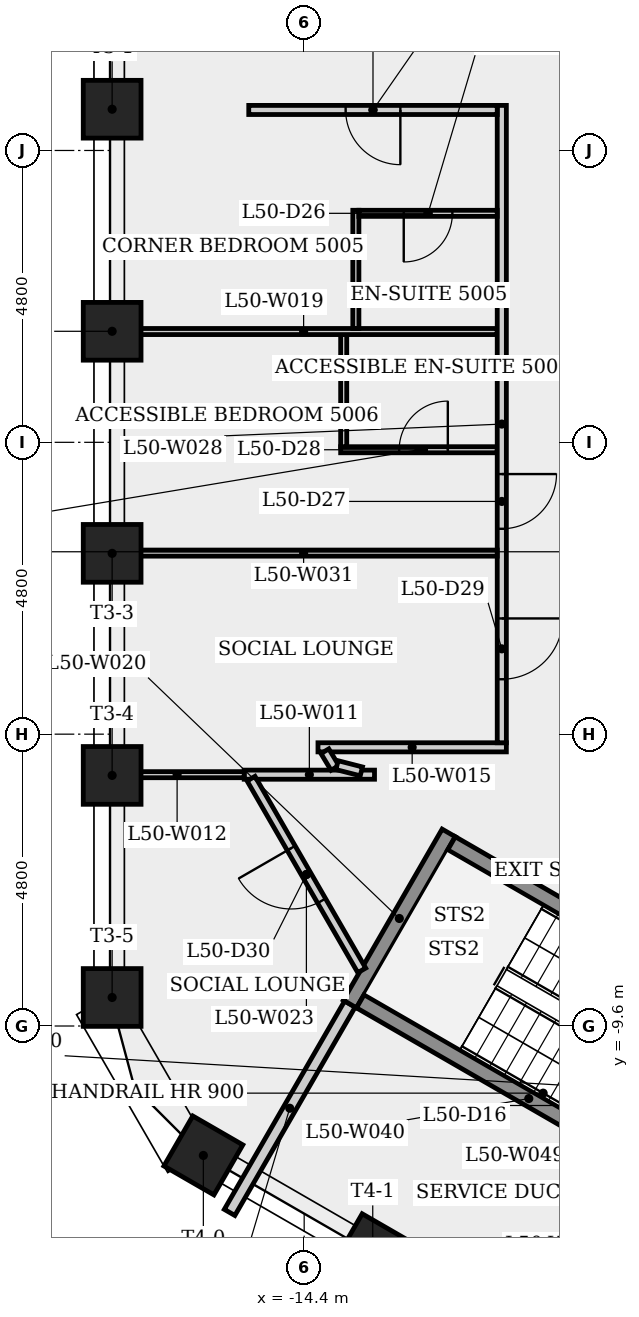
"""IFC4 building model, lengths in metres.
Left out: names, types, materials, properties, quantities, classifications, styles, units other than length and angle.
Written with IfcOpenShell. Run it as: python <this file> out.ifc"""

import sys

from ifc_helpers import new_model, si_unit, direction, frame, frame_2d, origin, origin_2d, place, context, subcontext, project, spatial, rectangle, extrude, element, fill, save


model = new_model("IFC4")
c1 = context("Model", 3, precision=1e-05, world=origin(), true_north=direction((0.0, 1.0)))
c2 = subcontext(c1, "Body", "Model", "MODEL_VIEW")
j1 = project(units=[si_unit("LENGTHUNIT", "METRE"), si_unit("PLANEANGLEUNIT", "RADIAN")], contexts=[c1])
p1 = place(None, origin())
s1 = spatial("IfcSite", under=j1, at=p1, CompositionType="ELEMENT")
p2 = place(p1, origin())
s2 = spatial("IfcBuilding", under=s1, at=p2, CompositionType="ELEMENT")
p3 = place(p2, frame((0.0, 0.0, 186.7)))
s3 = spatial("IfcBuildingStorey", under=s2, at=p3, CompositionType="ELEMENT", Elevation=186.7)
for number, where, z_axis, x_axis in (
    (1, (-17.558, 5.479, 0.0), (0.0, 0.0, 1.0), (-1.0, 0.0, 0.0)),
    (2, (-17.558, 1.826, 0.0), (0.0, 0.0, 1.0), (-1.0, 0.0, 0.0)),
    (3, (-17.558, -1.826, 0.0), (0.0, 0.0, 1.0), (-1.0, 0.0, 0.0)),
    (4, (-17.558, -5.479, 0.0), (0.0, 0.0, 1.0), (-1.0, 0.0, 0.0)),
    (5, (-17.558, -9.131, 0.0), (0.0, 0.0, 1.0), (-1.0, 0.0, 0.0)),
    (6, (-16.058, -11.729, 0.0), (0.0, 0.0, 1.0), (-0.5, -0.866, 0.0)),
    (7, (-13.272, -13.337, 0.0), (0.0, 0.0, 1.0), (-0.5, -0.866, 0.0)),
):
    element("IfcColumn", number, at=place(p3, frame(where, z_axis=z_axis, x_axis=x_axis)), inside=s3, PredefinedType="COLUMN", context=c2, shape_type="SweptSolid", body=[
        extrude(rectangle(XDim=0.95, YDim=0.95, at=origin_2d()), origin(), (0.0, 0.0, 1.0), 4.0),
    ])
p4 = place(p3, frame((-15.627, -12.666, 0.0), z_axis=(0.0, 0.0, 1.0), x_axis=(0.499980548326, 0.866036633923, 0.0)))
e8 = element("IfcWall", 8, at=p4, inside=s3, PredefinedType="PLUMBINGWALL", context=c2, shape_type="SweptSolid", body=[
    extrude(rectangle(XDim=3.958, YDim=0.2, at=frame_2d((1.979, 0.0))), origin(), (0.0, 0.0, 1.0), 3.6),
])
p5 = place(p3, frame((-15.386, -5.466, 0.0), z_axis=(0.0, 0.0, 1.0), x_axis=(1.0, 0.0, 0.0)))
e9 = element("IfcWall", 9, at=p5, inside=s3, PredefinedType="PARTITIONING", context=c2, shape_type="SweptSolid", body=[
    extrude(rectangle(XDim=2.143, YDim=0.15, at=frame_2d((1.072, 0.0))), origin(), (0.0, 0.0, 1.0), 3.6),
])
p6 = place(p3, frame((-15.386, -5.466, 0.0), z_axis=(0.0, 0.0, 1.0), x_axis=(-1.0, 0.0, 0.0)))
e10 = element("IfcWall", 10, at=p6, inside=s3, PredefinedType="PARTITIONING", context=c2, shape_type="SweptSolid", body=[
    extrude(rectangle(XDim=2.207, YDim=0.1, at=frame_2d((1.104, 0.0))), origin(), (0.0, 0.0, 1.0), 3.6),
])
p7 = place(p3, frame((-14.173, -5.016, 0.0), z_axis=(0.0, 0.0, 1.0), x_axis=(1.0, 0.0, 0.0)))
e11 = element("IfcWall", 11, at=p7, inside=s3, PredefinedType="PARTITIONING", context=c2, shape_type="SweptSolid", body=[
    extrude(rectangle(XDim=3.098, YDim=0.15, at=frame_2d((1.549, 0.0))), origin(), (0.0, 0.0, 1.0), 3.6),
])
p8 = place(p3, frame((-13.894, -5.355, 0.0), z_axis=(0.0, 0.0, 1.0), x_axis=(-0.51595199771, 0.856617496937, 0.0)))
e12 = element("IfcWall", 12, at=p8, inside=s3, PredefinedType="PARTITIONING", context=c2, shape_type="SweptSolid", body=[
    extrude(rectangle(XDim=0.32, YDim=0.15, at=frame_2d((0.16, 0.0))), origin(), (0.0, 0.0, 1.0), 3.6),
])
p9 = place(p3, frame((-13.8, -0.122, 0.0), z_axis=(0.0, 0.0, 1.0), x_axis=(1.0, 0.0, 0.0)))
e13 = element("IfcWall", 13, at=p9, inside=s3, PredefinedType="PARTITIONING", context=c2, shape_type="SweptSolid", body=[
    extrude(rectangle(XDim=2.575, YDim=0.1, at=frame_2d((1.288, 0.0))), origin(), (0.0, 0.0, 1.0), 3.6),
])
p10 = place(p9, frame((0.962, 0.0, 0.0)))
e14 = element("IfcOpeningElement", 14, at=p10, cuts=e13, PredefinedType="OPENING", context=c2, shape_type="SweptSolid", body=[
    extrude(rectangle(XDim=0.8, YDim=2.1, at=frame_2d((0.4, 1.05))), frame((0.0, 0.06, 0.0), z_axis=(0.0, -1.0, 0.0), x_axis=(1.0, 0.0, 0.0)), (0.0, 0.0, 1.0), 0.12),
])
p11 = place(p3, frame((-13.75, 1.772, 0.0), z_axis=(0.0, 0.0, 1.0), x_axis=(0.0, -1.0, 0.0)))
e15 = element("IfcWall", 15, at=p11, inside=s3, PredefinedType="PARTITIONING", context=c2, shape_type="SweptSolid", body=[
    extrude(rectangle(XDim=1.844, YDim=0.1, at=frame_2d((0.922, 0.0))), origin(), (0.0, 0.0, 1.0), 3.6),
])
p12 = place(p3, frame((-17.593, 1.822, 0.0), z_axis=(0.0, 0.0, 1.0), x_axis=(1.0, 0.0, 0.0)))
e16 = element("IfcWall", 16, at=p12, inside=s3, PredefinedType="PARTITIONING", context=c2, shape_type="SweptSolid", body=[
    extrude(rectangle(XDim=6.368, YDim=0.1, at=frame_2d((3.184, 0.0))), origin(), (0.0, 0.0, 1.0), 3.6),
])
p13 = place(p3, frame((-13.648, -9.239, 0.0), z_axis=(0.0, 0.0, 1.0), x_axis=(0.500017246033, 0.866015446554, 0.0)))
e17 = element("IfcWall", 17, at=p13, inside=s3, PredefinedType="SHEAR", context=c2, shape_type="SweptSolid", body=[
    extrude(rectangle(XDim=3.25, YDim=0.25, at=frame_2d((1.625, 0.0))), origin(), (0.0, 0.0, 1.0), 3.6),
])
p14 = place(p3, frame((-13.55, 3.816, 0.0), z_axis=(0.0, 0.0, 1.0), x_axis=(0.0, -1.0, 0.0)))
e18 = element("IfcWall", 18, at=p14, inside=s3, PredefinedType="PARTITIONING", context=c2, shape_type="SweptSolid", body=[
    extrude(rectangle(XDim=1.944, YDim=0.1, at=frame_2d((0.972, 0.0))), origin(), (0.0, 0.0, 1.0), 3.6),
])
p15 = place(p3, frame((-13.459, -5.412, 0.0), z_axis=(0.0, 0.0, 1.0), x_axis=(-0.968736704431, 0.248091107232, 0.0)))
e19 = element("IfcWall", 19, at=p15, inside=s3, PredefinedType="PARTITIONING", context=c2, shape_type="SweptSolid", body=[
    extrude(rectangle(XDim=0.413, YDim=0.15, at=frame_2d((0.207, 0.0))), origin(), (0.0, 0.0, 1.0), 3.6),
])
p16 = place(p3, frame((-13.453, -8.685, 0.0), z_axis=(0.0, 0.0, 1.0), x_axis=(-0.499989401968, 0.866031522475, 0.0)))
e20 = element("IfcWall", 20, at=p16, inside=s3, PredefinedType="PARTITIONING", context=c2, shape_type="SweptSolid", body=[
    extrude(rectangle(XDim=3.642, YDim=0.15, at=frame_2d((1.821, 0.0))), origin(), (0.0, 0.0, 1.0), 3.6),
])
p17 = place(p16, frame((1.321, 0.0, 0.0)))
e21 = element("IfcOpeningElement", 21, at=p17, cuts=e20, PredefinedType="OPENING", context=c2, shape_type="SweptSolid", body=[
    extrude(rectangle(XDim=1.0, YDim=2.1, at=frame_2d((0.5, 1.05))), frame((0.0, 0.085, 0.0), z_axis=(0.0, -1.0, 0.0), x_axis=(1.0, 0.0, 0.0)), (0.0, 0.0, 1.0), 0.17),
])
p18 = place(p3, frame((-11.977, -6.595, 0.0), z_axis=(0.0, 0.0, 1.0), x_axis=(0.866025499775, -0.499999833739, 0.0)))
e22 = element("IfcWall", 22, at=p18, inside=s3, PredefinedType="SHEAR", context=c2, shape_type="SweptSolid", body=[
    extrude(rectangle(XDim=6.4, YDim=0.25, at=frame_2d((3.2, 0.0))), origin(), (0.0, 0.0, 1.0), 3.6),
])
p19 = place(p18, frame((5.025, 0.0, 0.0)))
e23 = element("IfcOpeningElement", 23, at=p19, cuts=e22, PredefinedType="OPENING", context=c2, shape_type="SweptSolid", body=[
    extrude(rectangle(XDim=1.0, YDim=2.1, at=frame_2d((0.5, 1.05))), frame((0.0, 0.135, 0.0), z_axis=(0.0, -1.0, 0.0), x_axis=(1.0, 0.0, 0.0)), (0.0, 0.0, 1.0), 0.27),
])
p20 = place(p3, frame((-11.15, 5.542, 0.0), z_axis=(0.0, 0.0, 1.0), x_axis=(0.0, -1.0, 0.0)))
e24 = element("IfcWall", 24, at=p20, inside=s3, PredefinedType="PARTITIONING", context=c2, shape_type="SweptSolid", body=[
    extrude(rectangle(XDim=10.483, YDim=0.15, at=frame_2d((5.241, 0.0))), origin(), (0.0, 0.0, 1.0), 3.6),
])
p21 = place(p20, frame((6.063, 0.0, 0.0)))
e25 = element("IfcOpeningElement", 25, at=p21, cuts=e24, PredefinedType="OPENING", context=c2, shape_type="SweptSolid", body=[
    extrude(rectangle(XDim=0.9, YDim=2.1, at=frame_2d((0.45, 1.05))), frame((0.0, 0.085, 0.0), z_axis=(0.0, -1.0, 0.0), x_axis=(1.0, 0.0, 0.0)), (0.0, 0.0, 1.0), 0.17),
])
p22 = place(p20, frame((8.438, 0.0, 0.0)))
e26 = element("IfcOpeningElement", 26, at=p22, cuts=e24, PredefinedType="OPENING", context=c2, shape_type="SweptSolid", body=[
    extrude(rectangle(XDim=1.0, YDim=2.1, at=frame_2d((0.5, 1.05))), frame((0.0, 0.085, 0.0), z_axis=(0.0, -1.0, 0.0), x_axis=(1.0, 0.0, 0.0)), (0.0, 0.0, 1.0), 0.17),
])
p23 = place(p3, frame((-11.225, 3.766, 0.0), z_axis=(0.0, 0.0, 1.0), x_axis=(-1.0, 0.0, 0.0)))
e27 = element("IfcWall", 27, at=p23, inside=s3, PredefinedType="PARTITIONING", context=c2, shape_type="SweptSolid", body=[
    extrude(rectangle(XDim=2.275, YDim=0.1, at=frame_2d((1.137, 0.0))), origin(), (0.0, 0.0, 1.0), 3.6),
])
p24 = place(p23, frame((0.738, 0.0, 0.0)))
e28 = element("IfcOpeningElement", 28, at=p24, cuts=e27, PredefinedType="OPENING", context=c2, shape_type="SweptSolid", body=[
    extrude(rectangle(XDim=0.8, YDim=2.1, at=frame_2d((0.4, 1.05))), frame((0.0, 0.06, 0.0), z_axis=(0.0, -1.0, 0.0), x_axis=(1.0, 0.0, 0.0)), (0.0, 0.0, 1.0), 0.12),
])
p25 = place(p3, frame((-11.225, 5.466, 0.0), z_axis=(0.0, 0.0, 1.0), x_axis=(-1.0, 0.0, 0.0)))
e29 = element("IfcWall", 29, at=p25, inside=s3, PredefinedType="PARTITIONING", context=c2, shape_type="SweptSolid", body=[
    extrude(rectangle(XDim=4.086, YDim=0.15, at=frame_2d((2.043, 0.0))), origin(), (0.0, 0.0, 1.0), 3.6),
])
p26 = place(p25, frame((1.593, 0.0, 0.0)))
e30 = element("IfcOpeningElement", 30, at=p26, cuts=e29, PredefinedType="OPENING", context=c2, shape_type="SweptSolid", body=[
    extrude(rectangle(XDim=0.9, YDim=2.1, at=frame_2d((0.45, 1.05))), frame((0.0, 0.085, 0.0), z_axis=(0.0, -1.0, 0.0), x_axis=(1.0, 0.0, 0.0)), (0.0, 0.0, 1.0), 0.17),
])
p27 = place(p3, frame((-11.225, -1.822, 0.0), z_axis=(0.0, 0.0, 1.0), x_axis=(-1.0, 0.0, 0.0)))
e31 = element("IfcWall", 31, at=p27, inside=s3, PredefinedType="PARTITIONING", context=c2, shape_type="SweptSolid", body=[
    extrude(rectangle(XDim=6.368, YDim=0.1, at=frame_2d((3.184, 0.0))), origin(), (0.0, 0.0, 1.0), 3.6),
])
p28 = place(p3, frame((-7.935, -12.393, 0.0), z_axis=(0.0, 0.0, 1.0), x_axis=(-0.866025499775, 0.499999833739, 0.0)))
e32 = element("IfcWall", 32, at=p28, inside=s3, PredefinedType="SHEAR", context=c2, shape_type="SweptSolid", body=[
    extrude(rectangle(XDim=6.4, YDim=0.25, at=frame_2d((3.2, 0.0))), origin(), (0.0, 0.0, 1.0), 3.6),
])
p29 = place(p26, origin())
e33 = element("IfcDoor", 33, at=p29, inside=s3, OperationType="SINGLE_SWING_LEFT", PredefinedType="DOOR", context=c2, shape_type="SweptSolid", body=[
    extrude(rectangle(XDim=0.9, YDim=2.1, at=frame_2d((0.45, 1.05))), frame((0.0, 0.025, 0.0), z_axis=(0.0, -1.0, 0.0), x_axis=(1.0, 0.0, 0.0)), (0.0, 0.0, 1.0), 0.05),
])
fill(e30, e33)
p30 = place(p24, origin())
e34 = element("IfcDoor", 34, at=p30, inside=s3, OperationType="SINGLE_SWING_RIGHT", PredefinedType="DOOR", context=c2, shape_type="SweptSolid", body=[
    extrude(rectangle(XDim=0.8, YDim=2.1, at=frame_2d((0.4, 1.05))), frame((0.0, 0.025, 0.0), z_axis=(0.0, -1.0, 0.0), x_axis=(1.0, 0.0, 0.0)), (0.0, 0.0, 1.0), 0.05),
])
fill(e28, e34)
p31 = place(p21, origin())
e35 = element("IfcDoor", 35, at=p31, inside=s3, OperationType="SINGLE_SWING_LEFT", PredefinedType="DOOR", context=c2, shape_type="SweptSolid", body=[
    extrude(rectangle(XDim=0.9, YDim=2.1, at=frame_2d((0.45, 1.05))), frame((0.0, 0.025, 0.0), z_axis=(0.0, -1.0, 0.0), x_axis=(1.0, 0.0, 0.0)), (0.0, 0.0, 1.0), 0.05),
])
fill(e25, e35)
p32 = place(p10, origin())
e36 = element("IfcDoor", 36, at=p32, inside=s3, OperationType="SINGLE_SWING_RIGHT", PredefinedType="DOOR", context=c2, shape_type="SweptSolid", body=[
    extrude(rectangle(XDim=0.8, YDim=2.1, at=frame_2d((0.4, 1.05))), frame((0.0, 0.025, 0.0), z_axis=(0.0, -1.0, 0.0), x_axis=(1.0, 0.0, 0.0)), (0.0, 0.0, 1.0), 0.05),
])
fill(e14, e36)
p33 = place(p22, origin())
e37 = element("IfcDoor", 37, at=p33, inside=s3, OperationType="SINGLE_SWING_LEFT", PredefinedType="DOOR", context=c2, shape_type="SweptSolid", body=[
    extrude(rectangle(XDim=1.0, YDim=2.1, at=frame_2d((0.5, 1.05))), frame((0.0, 0.025, 0.0), z_axis=(0.0, -1.0, 0.0), x_axis=(1.0, 0.0, 0.0)), (0.0, 0.0, 1.0), 0.05),
])
fill(e26, e37)
p34 = place(p17, origin())
e38 = element("IfcDoor", 38, at=p34, inside=s3, OperationType="SINGLE_SWING_RIGHT", PredefinedType="DOOR", context=c2, shape_type="SweptSolid", body=[
    extrude(rectangle(XDim=1.0, YDim=2.1, at=frame_2d((0.5, 1.05))), frame((0.0, 0.025, 0.0), z_axis=(0.0, -1.0, 0.0), x_axis=(1.0, 0.0, 0.0)), (0.0, 0.0, 1.0), 0.05),
])
fill(e21, e38)
save(model, sys.argv[1])
